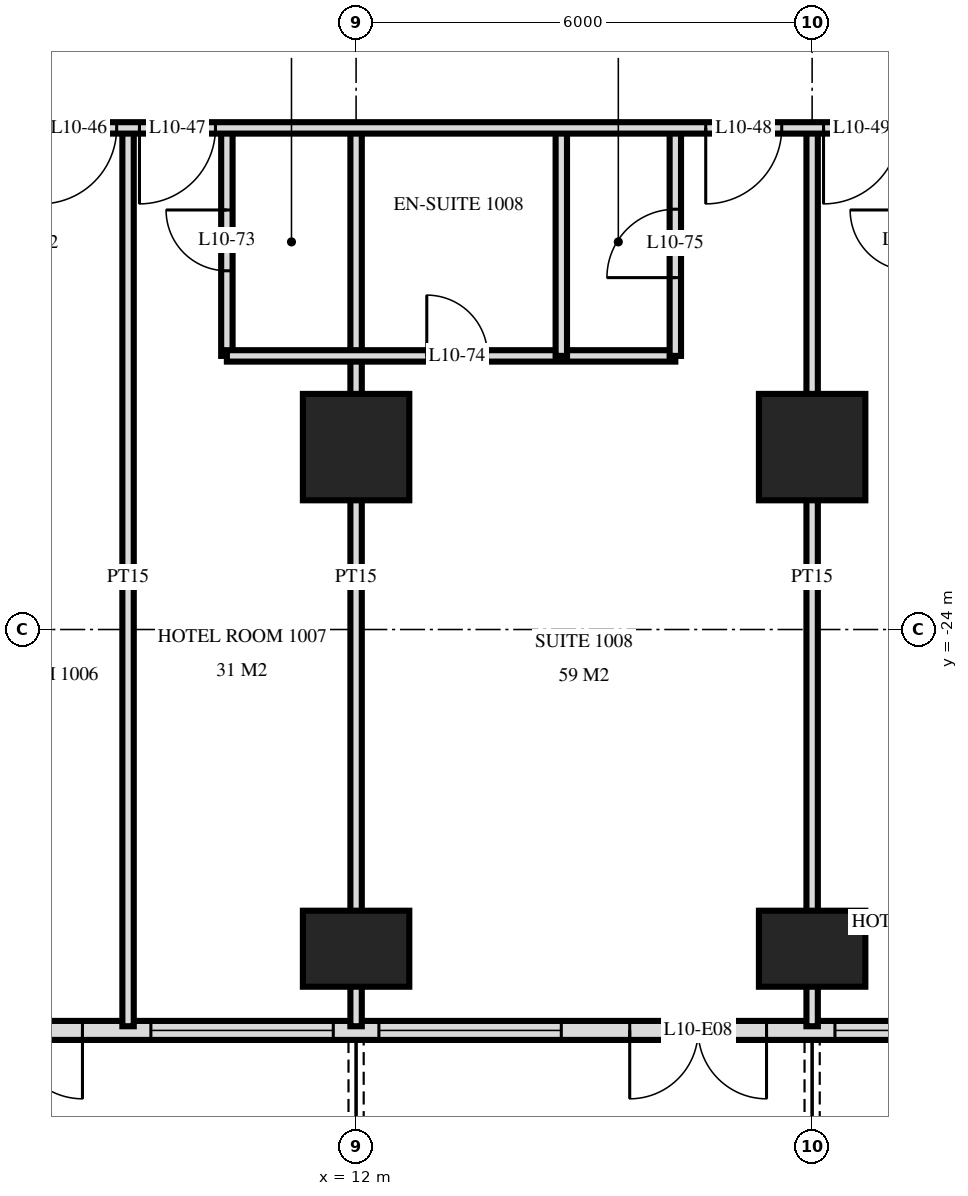
"""IFC4 building model, lengths in metres.
Left out: names, types, materials, properties, quantities, classifications, styles, units other than length and angle.
Written with IfcOpenShell. Run it as: python <this file> out.ifc"""

import sys

from ifc_helpers import new_model, si_unit, direction, frame, frame_2d, origin, origin_2d, place, context, subcontext, project, spatial, rectangle, extrude, element, fill, save


model = new_model("IFC4")
c1 = context("Model", 3, precision=1e-05, world=origin(), true_north=direction((0.0, 1.0)))
c2 = subcontext(c1, "Body", "Model", "MODEL_VIEW")
j1 = project(units=[si_unit("LENGTHUNIT", "METRE"), si_unit("PLANEANGLEUNIT", "RADIAN")], contexts=[c1])
p1 = place(None, origin())
s1 = spatial("IfcSite", under=j1, at=p1, CompositionType="ELEMENT")
p2 = place(p1, origin())
s2 = spatial("IfcBuilding", under=s1, at=p2, CompositionType="ELEMENT")
p3 = place(p2, frame((0.0, 0.0, 45.6)))
s3 = spatial("IfcBuildingStorey", under=s2, at=p3, CompositionType="ELEMENT", Elevation=45.6)
p4 = place(p3, frame((12.0, -28.2, 0.0), z_axis=(0.0, 0.0, 1.0), x_axis=(1.0, 0.0, 0.0)))
e1 = element("IfcColumn", 1, at=p4, inside=s3, PredefinedType="COLUMN", context=c2, shape_type="SweptSolid", body=[
    extrude(rectangle(XDim=1.4, YDim=1.0, at=origin_2d()), origin(), (0.0, 0.0, 1.0), 3.6),
])
p5 = place(p3, frame((12.0, -21.6, 0.0), z_axis=(0.0, 0.0, 1.0), x_axis=(1.0, 0.0, 0.0)))
e2 = element("IfcColumn", 2, at=p5, inside=s3, PredefinedType="COLUMN", context=c2, shape_type="SweptSolid", body=[
    extrude(rectangle(XDim=1.4, YDim=1.4, at=origin_2d()), origin(), (0.0, 0.0, 1.0), 3.6),
])
p6 = place(p3, frame((18.0, -28.2, 0.0), z_axis=(0.0, 0.0, 1.0), x_axis=(1.0, 0.0, 0.0)))
e3 = element("IfcColumn", 3, at=p6, inside=s3, PredefinedType="COLUMN", context=c2, shape_type="SweptSolid", body=[
    extrude(rectangle(XDim=1.4, YDim=1.0, at=origin_2d()), origin(), (0.0, 0.0, 1.0), 3.6),
])
p7 = place(p3, frame((18.0, -21.6, 0.0), z_axis=(0.0, 0.0, 1.0), x_axis=(1.0, 0.0, 0.0)))
e4 = element("IfcColumn", 4, at=p7, inside=s3, PredefinedType="COLUMN", context=c2, shape_type="SweptSolid", body=[
    extrude(rectangle(XDim=1.4, YDim=1.4, at=origin_2d()), origin(), (0.0, 0.0, 1.0), 3.6),
])
p8 = place(p3, frame((-28.775, -29.275, 0.0), z_axis=(0.0, 0.0, 1.0), x_axis=(1.0, 0.0, 0.0)))
e5 = element("IfcWall", 5, at=p8, inside=s3, PredefinedType="SOLIDWALL", context=c2, shape_type="SweptSolid", body=[
    extrude(rectangle(XDim=57.551, YDim=0.25, at=frame_2d((28.775, 0.0))), origin(), (0.0, 0.0, 1.0), 3.32),
])
p9 = place(p8, frame((0.575, 0.0, 0.0)))
e6 = element("IfcOpeningElement", 6, at=p9, cuts=e5, PredefinedType="OPENING", context=c2, shape_type="SweptSolid", body=[
    extrude(rectangle(XDim=1.8, YDim=2.4, at=frame_2d((0.9, 1.2))), frame((0.0, 0.135, 0.0), z_axis=(0.0, -1.0, 0.0), x_axis=(1.0, 0.0, 0.0)), (0.0, 0.0, 1.0), 0.27),
])
p10 = place(p8, frame((5.375, 0.0, 0.0)))
e7 = element("IfcOpeningElement", 7, at=p10, cuts=e5, PredefinedType="OPENING", context=c2, shape_type="SweptSolid", body=[
    extrude(rectangle(XDim=1.8, YDim=2.4, at=frame_2d((0.9, 1.2))), frame((0.0, 0.135, 0.0), z_axis=(0.0, -1.0, 0.0), x_axis=(1.0, 0.0, 0.0)), (0.0, 0.0, 1.0), 0.27),
])
p11 = place(p8, frame((8.075, 0.0, 0.3)))
e8 = element("IfcOpeningElement", 8, at=p11, cuts=e5, PredefinedType="OPENING", context=c2, shape_type="SweptSolid", body=[
    extrude(rectangle(XDim=2.4, YDim=2.1, at=frame_2d((1.2, 1.05))), frame((0.0, 0.135, 0.0), z_axis=(0.0, -1.0, 0.0), x_axis=(1.0, 0.0, 0.0)), (0.0, 0.0, 1.0), 0.27),
])
p12 = place(p8, frame((12.875, 0.0, 0.0)))
e9 = element("IfcOpeningElement", 9, at=p12, cuts=e5, PredefinedType="OPENING", context=c2, shape_type="SweptSolid", body=[
    extrude(rectangle(XDim=1.8, YDim=2.4, at=frame_2d((0.9, 1.2))), frame((0.0, 0.135, 0.0), z_axis=(0.0, -1.0, 0.0), x_axis=(1.0, 0.0, 0.0)), (0.0, 0.0, 1.0), 0.27),
])
p13 = place(p8, frame((17.375, 0.0, 0.0)))
e10 = element("IfcOpeningElement", 10, at=p13, cuts=e5, PredefinedType="OPENING", context=c2, shape_type="SweptSolid", body=[
    extrude(rectangle(XDim=1.8, YDim=2.4, at=frame_2d((0.9, 1.2))), frame((0.0, 0.135, 0.0), z_axis=(0.0, -1.0, 0.0), x_axis=(1.0, 0.0, 0.0)), (0.0, 0.0, 1.0), 0.27),
])
p14 = place(p8, frame((20.075, 0.0, 0.3)))
e11 = element("IfcOpeningElement", 11, at=p14, cuts=e5, PredefinedType="OPENING", context=c2, shape_type="SweptSolid", body=[
    extrude(rectangle(XDim=2.4, YDim=2.1, at=frame_2d((1.2, 1.05))), frame((0.0, 0.135, 0.0), z_axis=(0.0, -1.0, 0.0), x_axis=(1.0, 0.0, 0.0)), (0.0, 0.0, 1.0), 0.27),
])
p15 = place(p8, frame((23.075, 0.0, 0.3)))
e12 = element("IfcOpeningElement", 12, at=p15, cuts=e5, PredefinedType="OPENING", context=c2, shape_type="SweptSolid", body=[
    extrude(rectangle(XDim=2.4, YDim=2.1, at=frame_2d((1.2, 1.05))), frame((0.0, 0.135, 0.0), z_axis=(0.0, -1.0, 0.0), x_axis=(1.0, 0.0, 0.0)), (0.0, 0.0, 1.0), 0.27),
])
p16 = place(p8, frame((26.375, 0.0, 0.0)))
e13 = element("IfcOpeningElement", 13, at=p16, cuts=e5, PredefinedType="OPENING", context=c2, shape_type="SweptSolid", body=[
    extrude(rectangle(XDim=1.8, YDim=2.4, at=frame_2d((0.9, 1.2))), frame((0.0, 0.135, 0.0), z_axis=(0.0, -1.0, 0.0), x_axis=(1.0, 0.0, 0.0)), (0.0, 0.0, 1.0), 0.27),
])
p17 = place(p8, frame((29.075, 0.0, 0.3)))
e14 = element("IfcOpeningElement", 14, at=p17, cuts=e5, PredefinedType="OPENING", context=c2, shape_type="SweptSolid", body=[
    extrude(rectangle(XDim=2.4, YDim=2.1, at=frame_2d((1.2, 1.05))), frame((0.0, 0.135, 0.0), z_axis=(0.0, -1.0, 0.0), x_axis=(1.0, 0.0, 0.0)), (0.0, 0.0, 1.0), 0.27),
])
p18 = place(p8, frame((32.375, 0.0, 0.0)))
e15 = element("IfcOpeningElement", 15, at=p18, cuts=e5, PredefinedType="OPENING", context=c2, shape_type="SweptSolid", body=[
    extrude(rectangle(XDim=1.8, YDim=2.4, at=frame_2d((0.9, 1.2))), frame((0.0, 0.135, 0.0), z_axis=(0.0, -1.0, 0.0), x_axis=(1.0, 0.0, 0.0)), (0.0, 0.0, 1.0), 0.27),
])
p19 = place(p8, frame((35.375, 0.0, 0.0)))
e16 = element("IfcOpeningElement", 16, at=p19, cuts=e5, PredefinedType="OPENING", context=c2, shape_type="SweptSolid", body=[
    extrude(rectangle(XDim=1.8, YDim=2.4, at=frame_2d((0.9, 1.2))), frame((0.0, 0.135, 0.0), z_axis=(0.0, -1.0, 0.0), x_axis=(1.0, 0.0, 0.0)), (0.0, 0.0, 1.0), 0.27),
])
p20 = place(p8, frame((38.075, 0.0, 0.3)))
e17 = element("IfcOpeningElement", 17, at=p20, cuts=e5, PredefinedType="OPENING", context=c2, shape_type="SweptSolid", body=[
    extrude(rectangle(XDim=2.4, YDim=2.1, at=frame_2d((1.2, 1.05))), frame((0.0, 0.135, 0.0), z_axis=(0.0, -1.0, 0.0), x_axis=(1.0, 0.0, 0.0)), (0.0, 0.0, 1.0), 0.27),
])
p21 = place(p8, frame((41.075, 0.0, 0.3)))
e18 = element("IfcOpeningElement", 18, at=p21, cuts=e5, PredefinedType="OPENING", context=c2, shape_type="SweptSolid", body=[
    extrude(rectangle(XDim=2.4, YDim=2.1, at=frame_2d((1.2, 1.05))), frame((0.0, 0.135, 0.0), z_axis=(0.0, -1.0, 0.0), x_axis=(1.0, 0.0, 0.0)), (0.0, 0.0, 1.0), 0.27),
])
p22 = place(p8, frame((44.375, 0.0, 0.0)))
e19 = element("IfcOpeningElement", 19, at=p22, cuts=e5, PredefinedType="OPENING", context=c2, shape_type="SweptSolid", body=[
    extrude(rectangle(XDim=1.8, YDim=2.4, at=frame_2d((0.9, 1.2))), frame((0.0, 0.135, 0.0), z_axis=(0.0, -1.0, 0.0), x_axis=(1.0, 0.0, 0.0)), (0.0, 0.0, 1.0), 0.27),
])
p23 = place(p8, frame((47.075, 0.0, 0.3)))
e20 = element("IfcOpeningElement", 20, at=p23, cuts=e5, PredefinedType="OPENING", context=c2, shape_type="SweptSolid", body=[
    extrude(rectangle(XDim=2.4, YDim=2.1, at=frame_2d((1.2, 1.05))), frame((0.0, 0.135, 0.0), z_axis=(0.0, -1.0, 0.0), x_axis=(1.0, 0.0, 0.0)), (0.0, 0.0, 1.0), 0.27),
])
p24 = place(p8, frame((50.375, 0.0, 0.0)))
e21 = element("IfcOpeningElement", 21, at=p24, cuts=e5, PredefinedType="OPENING", context=c2, shape_type="SweptSolid", body=[
    extrude(rectangle(XDim=1.8, YDim=2.4, at=frame_2d((0.9, 1.2))), frame((0.0, 0.135, 0.0), z_axis=(0.0, -1.0, 0.0), x_axis=(1.0, 0.0, 0.0)), (0.0, 0.0, 1.0), 0.27),
])
p25 = place(p8, frame((53.375, 0.0, 0.0)))
e22 = element("IfcOpeningElement", 22, at=p25, cuts=e5, PredefinedType="OPENING", context=c2, shape_type="SweptSolid", body=[
    extrude(rectangle(XDim=1.8, YDim=2.4, at=frame_2d((0.9, 1.2))), frame((0.0, 0.135, 0.0), z_axis=(0.0, -1.0, 0.0), x_axis=(1.0, 0.0, 0.0)), (0.0, 0.0, 1.0), 0.27),
])
p26 = place(p3, frame((18.0, -29.22, 0.0), z_axis=(0.0, 0.0, 1.0), x_axis=(0.0, 1.0, 0.0)))
e23 = element("IfcWall", 23, at=p26, inside=s3, PredefinedType="PARTITIONING", context=c2, shape_type="SweptSolid", body=[
    extrude(rectangle(XDim=11.82, YDim=0.15, at=frame_2d((5.91, 0.0))), origin(), (0.0, 0.0, 1.0), 3.32),
])
p27 = place(p3, frame((16.2, -20.4, 0.0), z_axis=(0.0, 0.0, 1.0), x_axis=(0.0, 1.0, 0.0)))
e24 = element("IfcWall", 24, at=p27, inside=s3, PredefinedType="PARTITIONING", context=c2, shape_type="SweptSolid", body=[
    extrude(rectangle(XDim=3.0, YDim=0.15, at=frame_2d((1.5, 0.0))), origin(), (0.0, 0.0, 1.0), 3.32),
])
p28 = place(p27, frame((1.03, 0.0, 0.0)))
e25 = element("IfcOpeningElement", 25, at=p28, cuts=e24, PredefinedType="OPENING", context=c2, shape_type="SweptSolid", body=[
    extrude(rectangle(XDim=0.9, YDim=2.1, at=frame_2d((0.45, 1.05))), frame((0.0, 0.085, 0.0), z_axis=(0.0, -1.0, 0.0), x_axis=(1.0, 0.0, 0.0)), (0.0, 0.0, 1.0), 0.17),
])
p29 = place(p3, frame((14.7, -20.4, 0.0), z_axis=(0.0, 0.0, 1.0), x_axis=(0.0, 1.0, 0.0)))
e26 = element("IfcWall", 26, at=p29, inside=s3, PredefinedType="PARTITIONING", context=c2, shape_type="SweptSolid", body=[
    extrude(rectangle(XDim=3.0, YDim=0.15, at=frame_2d((1.5, 0.0))), origin(), (0.0, 0.0, 1.0), 3.32),
])
p30 = place(p3, frame((12.0, -29.22, 0.0), z_axis=(0.0, 0.0, 1.0), x_axis=(0.0, 1.0, 0.0)))
e27 = element("IfcWall", 27, at=p30, inside=s3, PredefinedType="PARTITIONING", context=c2, shape_type="SweptSolid", body=[
    extrude(rectangle(XDim=11.82, YDim=0.15, at=frame_2d((5.91, 0.0))), origin(), (0.0, 0.0, 1.0), 3.32),
])
p31 = place(p3, frame((10.3, -20.4, 0.0), z_axis=(0.0, 0.0, 1.0), x_axis=(0.0, 1.0, 0.0)))
e28 = element("IfcWall", 28, at=p31, inside=s3, PredefinedType="PARTITIONING", context=c2, shape_type="SweptSolid", body=[
    extrude(rectangle(XDim=3.0, YDim=0.15, at=frame_2d((1.5, 0.0))), origin(), (0.0, 0.0, 1.0), 3.32),
])
p32 = place(p31, frame((1.12, 0.0, 0.0)))
e29 = element("IfcOpeningElement", 29, at=p32, cuts=e28, PredefinedType="OPENING", context=c2, shape_type="SweptSolid", body=[
    extrude(rectangle(XDim=0.8, YDim=2.1, at=frame_2d((0.4, 1.05))), frame((0.0, 0.085, 0.0), z_axis=(0.0, -1.0, 0.0), x_axis=(1.0, 0.0, 0.0)), (0.0, 0.0, 1.0), 0.17),
])
p33 = place(p3, frame((9.0, -29.22, 0.0), z_axis=(0.0, 0.0, 1.0), x_axis=(0.0, 1.0, 0.0)))
e30 = element("IfcWall", 30, at=p33, inside=s3, PredefinedType="PARTITIONING", context=c2, shape_type="SweptSolid", body=[
    extrude(rectangle(XDim=11.82, YDim=0.15, at=frame_2d((5.91, 0.0))), origin(), (0.0, 0.0, 1.0), 3.32),
])
p34 = place(p3, frame((10.3, -20.4, 0.0), z_axis=(0.0, 0.0, 1.0), x_axis=(1.0, 0.0, 0.0)))
e31 = element("IfcWall", 31, at=p34, inside=s3, PredefinedType="PARTITIONING", context=c2, shape_type="SweptSolid", body=[
    extrude(rectangle(XDim=5.9, YDim=0.15, at=frame_2d((2.95, 0.0))), origin(), (0.0, 0.0, 1.0), 3.32),
])
p35 = place(p34, frame((2.63, 0.0, 0.0)))
e32 = element("IfcOpeningElement", 32, at=p35, cuts=e31, PredefinedType="OPENING", context=c2, shape_type="SweptSolid", body=[
    extrude(rectangle(XDim=0.8, YDim=2.1, at=frame_2d((0.4, 1.05))), frame((0.0, 0.085, 0.0), z_axis=(0.0, -1.0, 0.0), x_axis=(1.0, 0.0, 0.0)), (0.0, 0.0, 1.0), 0.17),
])
p36 = place(p3, frame((-33.12, -17.4, 0.0), z_axis=(0.0, 0.0, 1.0), x_axis=(1.0, 0.0, 0.0)))
e33 = element("IfcWall", 33, at=p36, inside=s3, PredefinedType="PARTITIONING", context=c2, shape_type="SweptSolid", body=[
    extrude(rectangle(XDim=66.24, YDim=0.15, at=frame_2d((33.12, 0.0))), origin(), (0.0, 0.0, 1.0), 3.32),
])
p37 = place(p36, frame((9.27, 0.0, 0.0)))
e34 = element("IfcOpeningElement", 34, at=p37, cuts=e33, PredefinedType="OPENING", context=c2, shape_type="SweptSolid", body=[
    extrude(rectangle(XDim=1.0, YDim=2.1, at=frame_2d((0.5, 1.05))), frame((0.0, 0.085, 0.0), z_axis=(0.0, -1.0, 0.0), x_axis=(1.0, 0.0, 0.0)), (0.0, 0.0, 1.0), 0.17),
])
p38 = place(p36, frame((13.97, 0.0, 0.0)))
e35 = element("IfcOpeningElement", 35, at=p38, cuts=e33, PredefinedType="OPENING", context=c2, shape_type="SweptSolid", body=[
    extrude(rectangle(XDim=1.0, YDim=2.1, at=frame_2d((0.5, 1.05))), frame((0.0, 0.085, 0.0), z_axis=(0.0, -1.0, 0.0), x_axis=(1.0, 0.0, 0.0)), (0.0, 0.0, 1.0), 0.17),
])
p39 = place(p36, frame((17.62, 0.0, 0.0)))
e36 = element("IfcOpeningElement", 36, at=p39, cuts=e33, PredefinedType="OPENING", context=c2, shape_type="SweptSolid", body=[
    extrude(rectangle(XDim=1.0, YDim=2.1, at=frame_2d((0.5, 1.05))), frame((0.0, 0.085, 0.0), z_axis=(0.0, -1.0, 0.0), x_axis=(1.0, 0.0, 0.0)), (0.0, 0.0, 1.0), 0.17),
])
p40 = place(p36, frame((21.27, 0.0, 0.0)))
e37 = element("IfcOpeningElement", 37, at=p40, cuts=e33, PredefinedType="OPENING", context=c2, shape_type="SweptSolid", body=[
    extrude(rectangle(XDim=1.0, YDim=2.1, at=frame_2d((0.5, 1.05))), frame((0.0, 0.085, 0.0), z_axis=(0.0, -1.0, 0.0), x_axis=(1.0, 0.0, 0.0)), (0.0, 0.0, 1.0), 0.17),
])
p41 = place(p36, frame((25.97, 0.0, 0.0)))
e38 = element("IfcOpeningElement", 38, at=p41, cuts=e33, PredefinedType="OPENING", context=c2, shape_type="SweptSolid", body=[
    extrude(rectangle(XDim=1.0, YDim=2.1, at=frame_2d((0.5, 1.05))), frame((0.0, 0.085, 0.0), z_axis=(0.0, -1.0, 0.0), x_axis=(1.0, 0.0, 0.0)), (0.0, 0.0, 1.0), 0.17),
])
p42 = place(p36, frame((35.62, 0.0, 0.0)))
e39 = element("IfcOpeningElement", 39, at=p42, cuts=e33, PredefinedType="OPENING", context=c2, shape_type="SweptSolid", body=[
    extrude(rectangle(XDim=1.0, YDim=2.1, at=frame_2d((0.5, 1.05))), frame((0.0, 0.085, 0.0), z_axis=(0.0, -1.0, 0.0), x_axis=(1.0, 0.0, 0.0)), (0.0, 0.0, 1.0), 0.17),
])
p43 = place(p36, frame((40.97, 0.0, 0.0)))
e40 = element("IfcOpeningElement", 40, at=p43, cuts=e33, PredefinedType="OPENING", context=c2, shape_type="SweptSolid", body=[
    extrude(rectangle(XDim=1.0, YDim=2.1, at=frame_2d((0.5, 1.05))), frame((0.0, 0.085, 0.0), z_axis=(0.0, -1.0, 0.0), x_axis=(1.0, 0.0, 0.0)), (0.0, 0.0, 1.0), 0.17),
])
p44 = place(p36, frame((42.27, 0.0, 0.0)))
e41 = element("IfcOpeningElement", 41, at=p44, cuts=e33, PredefinedType="OPENING", context=c2, shape_type="SweptSolid", body=[
    extrude(rectangle(XDim=1.0, YDim=2.1, at=frame_2d((0.5, 1.05))), frame((0.0, 0.085, 0.0), z_axis=(0.0, -1.0, 0.0), x_axis=(1.0, 0.0, 0.0)), (0.0, 0.0, 1.0), 0.17),
])
p45 = place(p36, frame((49.72, 0.0, 0.0)))
e42 = element("IfcOpeningElement", 42, at=p45, cuts=e33, PredefinedType="OPENING", context=c2, shape_type="SweptSolid", body=[
    extrude(rectangle(XDim=1.0, YDim=2.1, at=frame_2d((0.5, 1.05))), frame((0.0, 0.085, 0.0), z_axis=(0.0, -1.0, 0.0), x_axis=(1.0, 0.0, 0.0)), (0.0, 0.0, 1.0), 0.17),
])
p46 = place(p36, frame((51.27, 0.0, 0.0)))
e43 = element("IfcOpeningElement", 43, at=p46, cuts=e33, PredefinedType="OPENING", context=c2, shape_type="SweptSolid", body=[
    extrude(rectangle(XDim=1.0, YDim=2.1, at=frame_2d((0.5, 1.05))), frame((0.0, 0.085, 0.0), z_axis=(0.0, -1.0, 0.0), x_axis=(1.0, 0.0, 0.0)), (0.0, 0.0, 1.0), 0.17),
])
p47 = place(p36, frame((4.42, 0.0, 0.0)))
e44 = element("IfcOpeningElement", 44, at=p47, cuts=e33, PredefinedType="OPENING", context=c2, shape_type="SweptSolid", body=[
    extrude(rectangle(XDim=1.0, YDim=2.1, at=frame_2d((0.5, 1.05))), frame((0.0, 0.085, 0.0), z_axis=(0.0, -1.0, 0.0), x_axis=(1.0, 0.0, 0.0)), (0.0, 0.0, 1.0), 0.17),
])
p48 = place(p36, frame((54.82, 0.0, 0.0)))
e45 = element("IfcOpeningElement", 45, at=p48, cuts=e33, PredefinedType="OPENING", context=c2, shape_type="SweptSolid", body=[
    extrude(rectangle(XDim=1.0, YDim=2.1, at=frame_2d((0.5, 1.05))), frame((0.0, 0.085, 0.0), z_axis=(0.0, -1.0, 0.0), x_axis=(1.0, 0.0, 0.0)), (0.0, 0.0, 1.0), 0.17),
])
p49 = place(p19, frame((0.9, 0.0, 0.0), z_axis=(0.0, 0.0, 1.0), x_axis=(-1.0, 0.0, 0.0)))
e46 = element("IfcDoor", 46, at=p49, inside=s3, OperationType="DOUBLE_DOOR_SINGLE_SWING", PredefinedType="DOOR", context=c2, shape_type="SweptSolid", body=[
    extrude(rectangle(XDim=1.8, YDim=2.4, at=frame_2d((0.0, 1.2))), frame((0.0, -0.025, 0.0), z_axis=(0.0, 1.0, 0.0), x_axis=(-1.0, 0.0, 0.0)), (0.0, 0.0, 1.0), 0.05),
])
fill(e16, e46)
p50 = place(p20, origin())
e47 = element("IfcWindow", 47, at=p50, inside=s3, PartitioningType="SINGLE_PANEL", PredefinedType="WINDOW", context=c2, shape_type="SweptSolid", body=[
    extrude(rectangle(XDim=2.4, YDim=2.1, at=frame_2d((1.2, 1.05))), frame((0.0, 0.03, 0.0), z_axis=(0.0, -1.0, 0.0), x_axis=(1.0, 0.0, 0.0)), (0.0, 0.0, 1.0), 0.06),
])
fill(e17, e47)
p51 = place(p21, origin())
e48 = element("IfcWindow", 48, at=p51, inside=s3, PartitioningType="SINGLE_PANEL", PredefinedType="WINDOW", context=c2, shape_type="SweptSolid", body=[
    extrude(rectangle(XDim=2.4, YDim=2.1, at=frame_2d((1.2, 1.05))), frame((0.0, 0.03, 0.0), z_axis=(0.0, -1.0, 0.0), x_axis=(1.0, 0.0, 0.0)), (0.0, 0.0, 1.0), 0.06),
])
fill(e18, e48)
p52 = place(p22, frame((0.9, 0.0, 0.0), z_axis=(0.0, 0.0, 1.0), x_axis=(-1.0, 0.0, 0.0)))
e49 = element("IfcDoor", 49, at=p52, inside=s3, OperationType="DOUBLE_DOOR_SINGLE_SWING", PredefinedType="DOOR", context=c2, shape_type="SweptSolid", body=[
    extrude(rectangle(XDim=1.8, YDim=2.4, at=frame_2d((0.0, 1.2))), frame((0.0, -0.025, 0.0), z_axis=(0.0, 1.0, 0.0), x_axis=(-1.0, 0.0, 0.0)), (0.0, 0.0, 1.0), 0.05),
])
fill(e19, e49)
p53 = place(p23, origin())
e50 = element("IfcWindow", 50, at=p53, inside=s3, PartitioningType="SINGLE_PANEL", PredefinedType="WINDOW", context=c2, shape_type="SweptSolid", body=[
    extrude(rectangle(XDim=2.4, YDim=2.1, at=frame_2d((1.2, 1.05))), frame((0.0, 0.03, 0.0), z_axis=(0.0, -1.0, 0.0), x_axis=(1.0, 0.0, 0.0)), (0.0, 0.0, 1.0), 0.06),
])
fill(e20, e50)
p54 = place(p43, frame((0.5, 0.0, 0.0), z_axis=(0.0, 0.0, 1.0), x_axis=(-1.0, 0.0, 0.0)))
e51 = element("IfcDoor", 51, at=p54, inside=s3, OperationType="SINGLE_SWING_LEFT", PredefinedType="DOOR", context=c2, shape_type="SweptSolid", body=[
    extrude(rectangle(XDim=1.0, YDim=2.1, at=frame_2d((0.0, 1.05))), frame((0.0, -0.025, 0.0), z_axis=(0.0, 1.0, 0.0), x_axis=(-1.0, 0.0, 0.0)), (0.0, 0.0, 1.0), 0.05),
])
fill(e40, e51)
p55 = place(p44, frame((0.5, 0.0, 0.0), z_axis=(0.0, 0.0, 1.0), x_axis=(-1.0, 0.0, 0.0)))
e52 = element("IfcDoor", 52, at=p55, inside=s3, OperationType="SINGLE_SWING_LEFT", PredefinedType="DOOR", context=c2, shape_type="SweptSolid", body=[
    extrude(rectangle(XDim=1.0, YDim=2.1, at=frame_2d((0.0, 1.05))), frame((0.0, -0.025, 0.0), z_axis=(0.0, 1.0, 0.0), x_axis=(-1.0, 0.0, 0.0)), (0.0, 0.0, 1.0), 0.05),
])
fill(e41, e52)
p56 = place(p45, frame((0.5, 0.0, 0.0), z_axis=(0.0, 0.0, 1.0), x_axis=(-1.0, 0.0, 0.0)))
e53 = element("IfcDoor", 53, at=p56, inside=s3, OperationType="SINGLE_SWING_LEFT", PredefinedType="DOOR", context=c2, shape_type="SweptSolid", body=[
    extrude(rectangle(XDim=1.0, YDim=2.1, at=frame_2d((0.0, 1.05))), frame((0.0, -0.025, 0.0), z_axis=(0.0, 1.0, 0.0), x_axis=(-1.0, 0.0, 0.0)), (0.0, 0.0, 1.0), 0.05),
])
fill(e42, e53)
p57 = place(p46, frame((0.5, 0.0, 0.0), z_axis=(0.0, 0.0, 1.0), x_axis=(-1.0, 0.0, 0.0)))
e54 = element("IfcDoor", 54, at=p57, inside=s3, OperationType="SINGLE_SWING_LEFT", PredefinedType="DOOR", context=c2, shape_type="SweptSolid", body=[
    extrude(rectangle(XDim=1.0, YDim=2.1, at=frame_2d((0.0, 1.05))), frame((0.0, -0.025, 0.0), z_axis=(0.0, 1.0, 0.0), x_axis=(-1.0, 0.0, 0.0)), (0.0, 0.0, 1.0), 0.05),
])
fill(e43, e54)
p58 = place(p32, origin())
e55 = element("IfcDoor", 55, at=p58, inside=s3, OperationType="SINGLE_SWING_LEFT", PredefinedType="DOOR", context=c2, shape_type="SweptSolid", body=[
    extrude(rectangle(XDim=0.8, YDim=2.1, at=frame_2d((0.4, 1.05))), frame((0.0, 0.025, 0.0), z_axis=(0.0, -1.0, 0.0), x_axis=(1.0, 0.0, 0.0)), (0.0, 0.0, 1.0), 0.05),
])
fill(e29, e55)
p59 = place(p35, origin())
e56 = element("IfcDoor", 56, at=p59, inside=s3, OperationType="SINGLE_SWING_RIGHT", PredefinedType="DOOR", context=c2, shape_type="SweptSolid", body=[
    extrude(rectangle(XDim=0.8, YDim=2.1, at=frame_2d((0.4, 1.05))), frame((0.0, 0.025, 0.0), z_axis=(0.0, -1.0, 0.0), x_axis=(1.0, 0.0, 0.0)), (0.0, 0.0, 1.0), 0.05),
])
fill(e32, e56)
p60 = place(p28, origin())
e57 = element("IfcDoor", 57, at=p60, inside=s3, OperationType="SINGLE_SWING_RIGHT", PredefinedType="DOOR", context=c2, shape_type="SweptSolid", body=[
    extrude(rectangle(XDim=0.9, YDim=2.1, at=frame_2d((0.45, 1.05))), frame((0.0, 0.025, 0.0), z_axis=(0.0, -1.0, 0.0), x_axis=(1.0, 0.0, 0.0)), (0.0, 0.0, 1.0), 0.05),
])
fill(e25, e57)
save(model, sys.argv[1])
